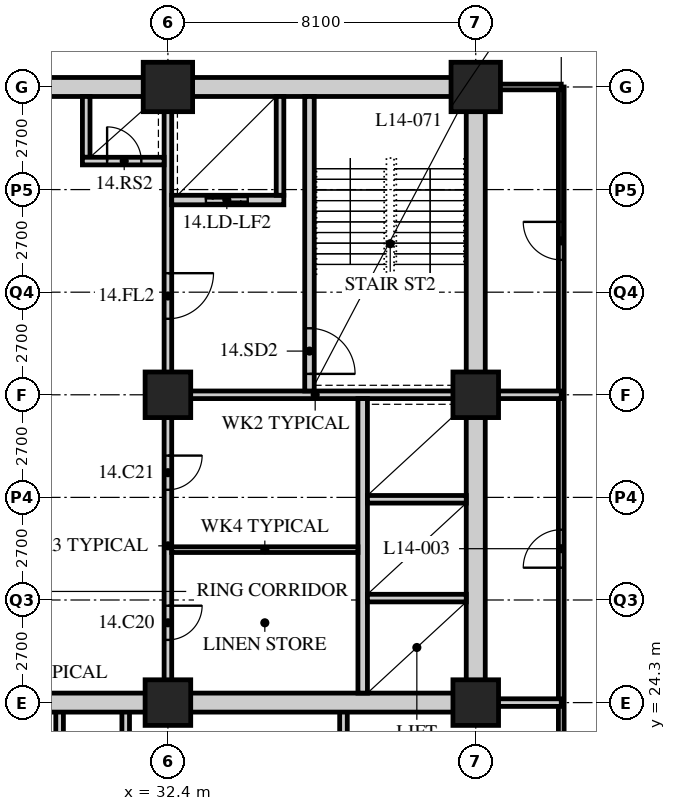
"""IFC4 building model, lengths in metres.
Left out: names, types, materials, properties, quantities, classifications, styles, units other than length and angle.
Written with IfcOpenShell. Run it as: python <this file> out.ifc"""

import sys

from ifc_helpers import new_model, si_unit, direction, frame, frame_2d, origin, origin_2d, place, context, subcontext, project, spatial, rectangle, hollow_rectangle, extrude, element, fill, save


model = new_model("IFC4")
c1 = context("Model", 3, precision=1e-05, world=origin(), true_north=direction((0.0, 1.0)))
c2 = subcontext(c1, "Body", "Model", "MODEL_VIEW")
j1 = project(units=[si_unit("LENGTHUNIT", "METRE"), si_unit("PLANEANGLEUNIT", "RADIAN")], contexts=[c1])
p1 = place(None, origin())
s1 = spatial("IfcSite", under=j1, at=p1, CompositionType="ELEMENT")
p2 = place(p1, origin())
s2 = spatial("IfcBuilding", under=s1, at=p2, CompositionType="ELEMENT")
p3 = place(p2, frame((0.0, 0.0, 60.2)))
s3 = spatial("IfcBuildingStorey", under=s2, at=p3, CompositionType="ELEMENT", Elevation=60.2)
for number, where, z_axis, x_axis in (
    (1, (32.4, 24.3, 0.0), (0.0, 0.0, 1.0), (1.0, 0.0, 0.0)),
    (2, (32.4, 32.4, 0.0), (0.0, 0.0, 1.0), (1.0, 0.0, 0.0)),
):
    element("IfcColumn", number, at=place(p3, frame(where, z_axis=z_axis, x_axis=x_axis)), inside=s3, PredefinedType="COLUMN", context=c2, shape_type="SweptSolid", body=[
        extrude(hollow_rectangle(XDim=1.2, YDim=1.2, WallThickness=0.12, at=origin_2d()), origin(), (0.0, 0.0, 1.0), 3.4),
    ])
p4 = place(p3, frame((32.4, 40.5, 0.0), z_axis=(0.0, 0.0, 1.0), x_axis=(1.0, 0.0, 0.0)))
e3 = element("IfcColumn", 3, at=p4, inside=s3, PredefinedType="COLUMN", context=c2, shape_type="SweptSolid", body=[
    extrude(hollow_rectangle(XDim=1.3, YDim=1.3, WallThickness=0.13, at=origin_2d()), origin(), (0.0, 0.0, 1.0), 3.4),
])
for number, where, z_axis, x_axis in (
    (4, (40.5, 24.3, 0.0), (0.0, 0.0, 1.0), (1.0, 0.0, 0.0)),
    (5, (40.5, 32.4, 0.0), (0.0, 0.0, 1.0), (1.0, 0.0, 0.0)),
):
    element("IfcColumn", number, at=place(p3, frame(where, z_axis=z_axis, x_axis=x_axis)), inside=s3, PredefinedType="COLUMN", context=c2, shape_type="SweptSolid", body=[
        extrude(hollow_rectangle(XDim=1.2, YDim=1.2, WallThickness=0.12, at=origin_2d()), origin(), (0.0, 0.0, 1.0), 3.4),
    ])
p5 = place(p3, frame((40.5, 40.5, 0.0), z_axis=(0.0, 0.0, 1.0), x_axis=(1.0, 0.0, 0.0)))
e6 = element("IfcColumn", 6, at=p5, inside=s3, PredefinedType="COLUMN", context=c2, shape_type="SweptSolid", body=[
    extrude(hollow_rectangle(XDim=1.3, YDim=1.3, WallThickness=0.13, at=origin_2d()), origin(), (0.0, 0.0, 1.0), 3.4),
])
p6 = place(p3, frame((42.75, 13.95, 0.0), z_axis=(0.0, 0.0, 1.0), x_axis=(0.0, 1.0, 0.0)))
e7 = element("IfcWall", 7, at=p6, inside=s3, PredefinedType="PARTITIONING", context=c2, shape_type="SweptSolid", body=[
    extrude(rectangle(XDim=26.55, YDim=0.15, at=frame_2d((13.275, 0.0))), origin(), (0.0, 0.0, 1.0), 3.19),
])
p7 = place(p6, frame((13.9, 0.0, 0.0)))
e8 = element("IfcOpeningElement", 8, at=p7, cuts=e7, PredefinedType="OPENING", context=c2, shape_type="SweptSolid", body=[
    extrude(rectangle(XDim=1.0, YDim=2.1, at=frame_2d((0.5, 1.05))), frame((0.0, 0.085, 0.0), z_axis=(0.0, -1.0, 0.0), x_axis=(1.0, 0.0, 0.0)), (0.0, 0.0, 1.0), 0.17),
])
p8 = place(p6, frame((22.0, 0.0, 0.0)))
e9 = element("IfcOpeningElement", 9, at=p8, cuts=e7, PredefinedType="OPENING", context=c2, shape_type="SweptSolid", body=[
    extrude(rectangle(XDim=1.0, YDim=2.1, at=frame_2d((0.5, 1.05))), frame((0.0, 0.085, 0.0), z_axis=(0.0, -1.0, 0.0), x_axis=(1.0, 0.0, 0.0)), (0.0, 0.0, 1.0), 0.17),
])
p9 = place(p3, frame((42.75, 40.5, 0.0), z_axis=(0.0, 0.0, 1.0), x_axis=(-1.0, 0.0, 0.0)))
e10 = element("IfcWall", 10, at=p9, inside=s3, PredefinedType="PARTITIONING", context=c2, shape_type="SweptSolid", body=[
    extrude(rectangle(XDim=2.05, YDim=0.15, at=frame_2d((1.025, 0.0))), origin(), (0.0, 0.0, 1.0), 2.578),
])
p10 = place(p3, frame((40.5, 32.4, 0.0), z_axis=(0.0, 0.0, 1.0), x_axis=(1.0, 0.0, 0.0)))
e11 = element("IfcWall", 11, at=p10, inside=s3, PredefinedType="SOLIDWALL", context=c2, shape_type="SweptSolid", body=[
    extrude(rectangle(XDim=2.25, YDim=0.2, at=frame_2d((1.125, 0.0))), origin(), (0.0, 0.0, 1.0), 2.578),
])
for number, where, z_axis, x_axis in (
    (12, (31.289, 13.95, 0.0), (0.0, 0.0, 1.0), (0.0, 1.0, 0.0)),
    (13, (37.02, 13.95, 0.0), (0.0, 0.0, 1.0), (0.0, 1.0, 0.0)),
    (14, (29.55, 13.95, 0.0), (0.0, 0.0, 1.0), (0.0, 1.0, 0.0)),
):
    element("IfcWall", number, at=place(p3, frame(where, z_axis=z_axis, x_axis=x_axis)), inside=s3, PredefinedType="SOLIDWALL", context=c2, shape_type="SweptSolid", body=[
        extrude(rectangle(XDim=10.35, YDim=0.2, at=frame_2d((5.175, 0.0))), origin(), (0.0, 0.0, 1.0), 3.19),
    ])
p11 = place(p3, frame((40.5, 24.3, 0.0), z_axis=(0.0, 0.0, 1.0), x_axis=(1.0, 0.0, 0.0)))
e15 = element("IfcWall", 15, at=p11, inside=s3, PredefinedType="SOLIDWALL", context=c2, shape_type="SweptSolid", body=[
    extrude(rectangle(XDim=2.25, YDim=0.2, at=frame_2d((1.125, 0.0))), origin(), (0.0, 0.0, 1.0), 2.578),
])
p12 = place(p3, frame((15.95, 24.3, 0.0), z_axis=(0.0, 0.0, 1.0), x_axis=(1.0, 0.0, 0.0)))
e16 = element("IfcWall", 16, at=p12, inside=s3, PredefinedType="SOLIDWALL", context=c2, shape_type="SweptSolid", body=[
    extrude(rectangle(XDim=24.8, YDim=0.5, at=frame_2d((12.4, 0.0))), origin(), (0.0, 0.0, 1.0), 2.54),
])
p13 = place(p12, frame((11.5, 0.0, 0.0)))
e17 = element("IfcOpeningElement", 17, at=p13, cuts=e16, PredefinedType="OPENING", context=c2, shape_type="SweptSolid", body=[
    extrude(rectangle(XDim=1.8, YDim=2.4, at=frame_2d((0.9, 1.2))), frame((0.0, 0.26, 0.0), z_axis=(0.0, -1.0, 0.0), x_axis=(1.0, 0.0, 0.0)), (0.0, 0.0, 1.0), 0.52),
])
p14 = place(p3, frame((15.95, 40.5, 0.0), z_axis=(0.0, 0.0, 1.0), x_axis=(1.0, 0.0, 0.0)))
e18 = element("IfcWall", 18, at=p14, inside=s3, PredefinedType="SOLIDWALL", context=c2, shape_type="SweptSolid", body=[
    extrude(rectangle(XDim=24.8, YDim=0.5, at=frame_2d((12.4, 0.0))), origin(), (0.0, 0.0, 1.0), 2.54),
])
p15 = place(p14, frame((11.5, 0.0, 0.0)))
e19 = element("IfcOpeningElement", 19, at=p15, cuts=e18, PredefinedType="OPENING", context=c2, shape_type="SweptSolid", body=[
    extrude(rectangle(XDim=1.8, YDim=2.4, at=frame_2d((0.9, 1.2))), frame((0.0, 0.26, 0.0), z_axis=(0.0, -1.0, 0.0), x_axis=(1.0, 0.0, 0.0)), (0.0, 0.0, 1.0), 0.52),
])
p16 = place(p3, frame((40.5, 24.55, 0.0), z_axis=(0.0, 0.0, 1.0), x_axis=(0.0, 1.0, 0.0)))
e20 = element("IfcWall", 20, at=p16, inside=s3, PredefinedType="SOLIDWALL", context=c2, shape_type="SweptSolid", body=[
    extrude(rectangle(XDim=15.7, YDim=0.5, at=frame_2d((7.85, 0.0))), origin(), (0.0, 0.0, 1.0), 2.578),
])
p17 = place(p3, frame((32.3, 32.4, 0.0), z_axis=(0.0, 0.0, 1.0), x_axis=(1.0, 0.0, 0.0)))
e21 = element("IfcWall", 21, at=p17, inside=s3, PredefinedType="SOLIDWALL", context=c2, shape_type="SweptSolid", body=[
    extrude(rectangle(XDim=7.95, YDim=0.2, at=frame_2d((3.975, 0.0))), origin(), (0.0, 0.0, 1.0), 2.578),
])
p18 = place(p3, frame((32.4, 32.5, 0.0), z_axis=(0.0, 0.0, 1.0), x_axis=(0.0, 1.0, 0.0)))
e22 = element("IfcWall", 22, at=p18, inside=s3, PredefinedType="SOLIDWALL", context=c2, shape_type="SweptSolid", body=[
    extrude(rectangle(XDim=7.75, YDim=0.2, at=frame_2d((3.875, 0.0))), origin(), (0.0, 0.0, 1.0), 2.578),
])
p19 = place(p18, frame((1.9, 0.0, 0.0)))
e23 = element("IfcOpeningElement", 23, at=p19, cuts=e22, PredefinedType="OPENING", context=c2, shape_type="SweptSolid", body=[
    extrude(rectangle(XDim=1.2, YDim=2.1, at=frame_2d((0.6, 1.05))), frame((0.0, 0.11, 0.0), z_axis=(0.0, -1.0, 0.0), x_axis=(1.0, 0.0, 0.0)), (0.0, 0.0, 1.0), 0.22),
])
p20 = place(p3, frame((37.525, 24.55, 0.0), z_axis=(0.0, 0.0, 1.0), x_axis=(0.0, 1.0, 0.0)))
e24 = element("IfcWall", 24, at=p20, inside=s3, PredefinedType="SOLIDWALL", context=c2, shape_type="SweptSolid", body=[
    extrude(rectangle(XDim=7.75, YDim=0.25, at=frame_2d((3.875, 0.0))), origin(), (0.0, 0.0, 1.0), 3.19),
])
for number, where, z_axis, x_axis in (
    (25, (37.65, 27.05, 0.0), (0.0, 0.0, 1.0), (1.0, 0.0, 0.0)),
    (26, (37.65, 29.65, 0.0), (0.0, 0.0, 1.0), (1.0, 0.0, 0.0)),
):
    element("IfcWall", number, at=place(p3, frame(where, z_axis=z_axis, x_axis=x_axis)), inside=s3, PredefinedType="SOLIDWALL", context=c2, shape_type="SweptSolid", body=[
        extrude(rectangle(XDim=2.6, YDim=0.2, at=frame_2d((1.3, 0.0))), origin(), (0.0, 0.0, 1.0), 3.19),
    ])
p21 = place(p3, frame((36.125, 32.5, 0.0), z_axis=(0.0, 0.0, 1.0), x_axis=(0.0, 1.0, 0.0)))
e27 = element("IfcWall", 27, at=p21, inside=s3, PredefinedType="SOLIDWALL", context=c2, shape_type="SweptSolid", body=[
    extrude(rectangle(XDim=7.75, YDim=0.25, at=frame_2d((3.875, 0.0))), origin(), (0.0, 0.0, 1.0), 3.19),
])
p22 = place(p21, frame((0.45, 0.0, 0.0)))
e28 = element("IfcOpeningElement", 28, at=p22, cuts=e27, PredefinedType="OPENING", context=c2, shape_type="SweptSolid", body=[
    extrude(rectangle(XDim=1.2, YDim=2.1, at=frame_2d((0.6, 1.05))), frame((0.0, 0.135, 0.0), z_axis=(0.0, -1.0, 0.0), x_axis=(1.0, 0.0, 0.0)), (0.0, 0.0, 1.0), 0.27),
])
p23 = place(p3, frame((32.5, 37.525, 0.0), z_axis=(0.0, 0.0, 1.0), x_axis=(1.0, 0.0, 0.0)))
e29 = element("IfcWall", 29, at=p23, inside=s3, PredefinedType="SOLIDWALL", context=c2, shape_type="SweptSolid", body=[
    extrude(rectangle(XDim=2.95, YDim=0.25, at=frame_2d((1.475, 0.0))), origin(), (0.0, 0.0, 1.0), 3.19),
])
p24 = place(p23, frame((0.9, 0.0, 0.0)))
e30 = element("IfcOpeningElement", 30, at=p24, cuts=e29, PredefinedType="OPENING", context=c2, shape_type="SweptSolid", body=[
    extrude(rectangle(XDim=1.1, YDim=2.4, at=frame_2d((0.55, 1.2))), frame((0.0, 0.135, 0.0), z_axis=(0.0, -1.0, 0.0), x_axis=(1.0, 0.0, 0.0)), (0.0, 0.0, 1.0), 0.27),
])
p25 = place(p3, frame((35.35, 37.65, 0.0), z_axis=(0.0, 0.0, 1.0), x_axis=(0.0, 1.0, 0.0)))
e31 = element("IfcWall", 31, at=p25, inside=s3, PredefinedType="SOLIDWALL", context=c2, shape_type="SweptSolid", body=[
    extrude(rectangle(XDim=2.6, YDim=0.2, at=frame_2d((1.3, 0.0))), origin(), (0.0, 0.0, 1.0), 3.19),
])
p26 = place(p3, frame((30.25, 38.65, 0.0), z_axis=(0.0, 0.0, 1.0), x_axis=(0.0, 1.0, 0.0)))
e32 = element("IfcWall", 32, at=p26, inside=s3, PredefinedType="SOLIDWALL", context=c2, shape_type="SweptSolid", body=[
    extrude(rectangle(XDim=1.6, YDim=0.2, at=frame_2d((0.8, 0.0))), origin(), (0.0, 0.0, 1.0), 3.19),
])
p27 = place(p3, frame((30.15, 38.55, 0.0), z_axis=(0.0, 0.0, 1.0), x_axis=(1.0, 0.0, 0.0)))
e33 = element("IfcWall", 33, at=p27, inside=s3, PredefinedType="SOLIDWALL", context=c2, shape_type="SweptSolid", body=[
    extrude(rectangle(XDim=2.15, YDim=0.2, at=frame_2d((1.075, 0.0))), origin(), (0.0, 0.0, 1.0), 3.19),
])
p28 = place(p27, frame((0.65, 0.0, 0.0)))
e34 = element("IfcOpeningElement", 34, at=p28, cuts=e33, PredefinedType="OPENING", context=c2, shape_type="SweptSolid", body=[
    extrude(rectangle(XDim=0.9, YDim=2.1, at=frame_2d((0.45, 1.05))), frame((0.0, 0.11, 0.0), z_axis=(0.0, -1.0, 0.0), x_axis=(1.0, 0.0, 0.0)), (0.0, 0.0, 1.0), 0.22),
])
p29 = place(p3, frame((32.4, 24.55, 0.0), z_axis=(0.0, 0.0, 1.0), x_axis=(0.0, 1.0, 0.0)))
e35 = element("IfcWall", 35, at=p29, inside=s3, PredefinedType="PARTITIONING", context=c2, shape_type="SweptSolid", body=[
    extrude(rectangle(XDim=7.75, YDim=0.2, at=frame_2d((3.875, 0.0))), origin(), (0.0, 0.0, 1.0), 2.578),
])
p30 = place(p29, frame((1.4, 0.0, 0.0)))
e36 = element("IfcOpeningElement", 36, at=p30, cuts=e35, PredefinedType="OPENING", context=c2, shape_type="SweptSolid", body=[
    extrude(rectangle(XDim=0.9, YDim=2.1, at=frame_2d((0.45, 1.05))), frame((0.0, 0.11, 0.0), z_axis=(0.0, -1.0, 0.0), x_axis=(1.0, 0.0, 0.0)), (0.0, 0.0, 1.0), 0.22),
])
p31 = place(p29, frame((5.35, 0.0, 0.0)))
e37 = element("IfcOpeningElement", 37, at=p31, cuts=e35, PredefinedType="OPENING", context=c2, shape_type="SweptSolid", body=[
    extrude(rectangle(XDim=0.9, YDim=2.1, at=frame_2d((0.45, 1.05))), frame((0.0, 0.11, 0.0), z_axis=(0.0, -1.0, 0.0), x_axis=(1.0, 0.0, 0.0)), (0.0, 0.0, 1.0), 0.22),
])
p32 = place(p3, frame((32.5, 28.325, 0.0), z_axis=(0.0, 0.0, 1.0), x_axis=(1.0, 0.0, 0.0)))
e38 = element("IfcWall", 38, at=p32, inside=s3, PredefinedType="PARTITIONING", context=c2, shape_type="SweptSolid", body=[
    extrude(rectangle(XDim=4.9, YDim=0.15, at=frame_2d((2.45, 0.0))), origin(), (0.0, 0.0, 1.0), 3.19),
])
p33 = place(p7, origin())
e39 = element("IfcDoor", 39, at=p33, inside=s3, OperationType="SINGLE_SWING_LEFT", PredefinedType="DOOR", context=c2, shape_type="SweptSolid", body=[
    extrude(rectangle(XDim=1.0, YDim=2.1, at=frame_2d((0.5, 1.05))), frame((0.0, 0.025, 0.0), z_axis=(0.0, -1.0, 0.0), x_axis=(1.0, 0.0, 0.0)), (0.0, 0.0, 1.0), 0.05),
])
fill(e8, e39)
p34 = place(p8, origin())
e40 = element("IfcDoor", 40, at=p34, inside=s3, OperationType="SINGLE_SWING_RIGHT", PredefinedType="DOOR", context=c2, shape_type="SweptSolid", body=[
    extrude(rectangle(XDim=1.0, YDim=2.1, at=frame_2d((0.5, 1.05))), frame((0.0, 0.025, 0.0), z_axis=(0.0, -1.0, 0.0), x_axis=(1.0, 0.0, 0.0)), (0.0, 0.0, 1.0), 0.05),
])
fill(e9, e40)
p35 = place(p30, origin())
e41 = element("IfcDoor", 41, at=p35, inside=s3, OperationType="SINGLE_SWING_LEFT", PredefinedType="DOOR", context=c2, shape_type="SweptSolid", body=[
    extrude(rectangle(XDim=0.9, YDim=2.1, at=frame_2d((0.45, 1.05))), frame((0.0, 0.025, 0.0), z_axis=(0.0, -1.0, 0.0), x_axis=(1.0, 0.0, 0.0)), (0.0, 0.0, 1.0), 0.05),
])
fill(e36, e41)
p36 = place(p31, origin())
e42 = element("IfcDoor", 42, at=p36, inside=s3, OperationType="SINGLE_SWING_LEFT", PredefinedType="DOOR", context=c2, shape_type="SweptSolid", body=[
    extrude(rectangle(XDim=0.9, YDim=2.1, at=frame_2d((0.45, 1.05))), frame((0.0, 0.025, 0.0), z_axis=(0.0, -1.0, 0.0), x_axis=(1.0, 0.0, 0.0)), (0.0, 0.0, 1.0), 0.05),
])
fill(e37, e42)
p37 = place(p22, origin())
e43 = element("IfcDoor", 43, at=p37, inside=s3, OperationType="SINGLE_SWING_RIGHT", PredefinedType="DOOR", context=c2, shape_type="SweptSolid", body=[
    extrude(rectangle(XDim=1.2, YDim=2.1, at=frame_2d((0.6, 1.05))), frame((0.0, 0.025, 0.0), z_axis=(0.0, -1.0, 0.0), x_axis=(1.0, 0.0, 0.0)), (0.0, 0.0, 1.0), 0.05),
])
fill(e28, e43)
p38 = place(p19, origin())
e44 = element("IfcDoor", 44, at=p38, inside=s3, OperationType="SINGLE_SWING_LEFT", PredefinedType="DOOR", context=c2, shape_type="SweptSolid", body=[
    extrude(rectangle(XDim=1.2, YDim=2.1, at=frame_2d((0.6, 1.05))), frame((0.0, 0.025, 0.0), z_axis=(0.0, -1.0, 0.0), x_axis=(1.0, 0.0, 0.0)), (0.0, 0.0, 1.0), 0.05),
])
fill(e23, e44)
p39 = place(p28, origin())
e45 = element("IfcDoor", 45, at=p39, inside=s3, OperationType="SINGLE_SWING_LEFT", PredefinedType="DOOR", context=c2, shape_type="SweptSolid", body=[
    extrude(rectangle(XDim=0.9, YDim=2.1, at=frame_2d((0.45, 1.05))), frame((0.0, 0.025, 0.0), z_axis=(0.0, -1.0, 0.0), x_axis=(1.0, 0.0, 0.0)), (0.0, 0.0, 1.0), 0.05),
])
fill(e34, e45)
p40 = place(p24, origin())
e46 = element("IfcDoor", 46, at=p40, inside=s3, OperationType="DOUBLE_DOOR_SLIDING", PredefinedType="DOOR", context=c2, shape_type="SweptSolid", body=[
    extrude(rectangle(XDim=1.1, YDim=2.4, at=frame_2d((0.55, 1.2))), frame((0.0, 0.025, 0.0), z_axis=(0.0, -1.0, 0.0), x_axis=(1.0, 0.0, 0.0)), (0.0, 0.0, 1.0), 0.05),
])
fill(e30, e46)
save(model, sys.argv[1])
